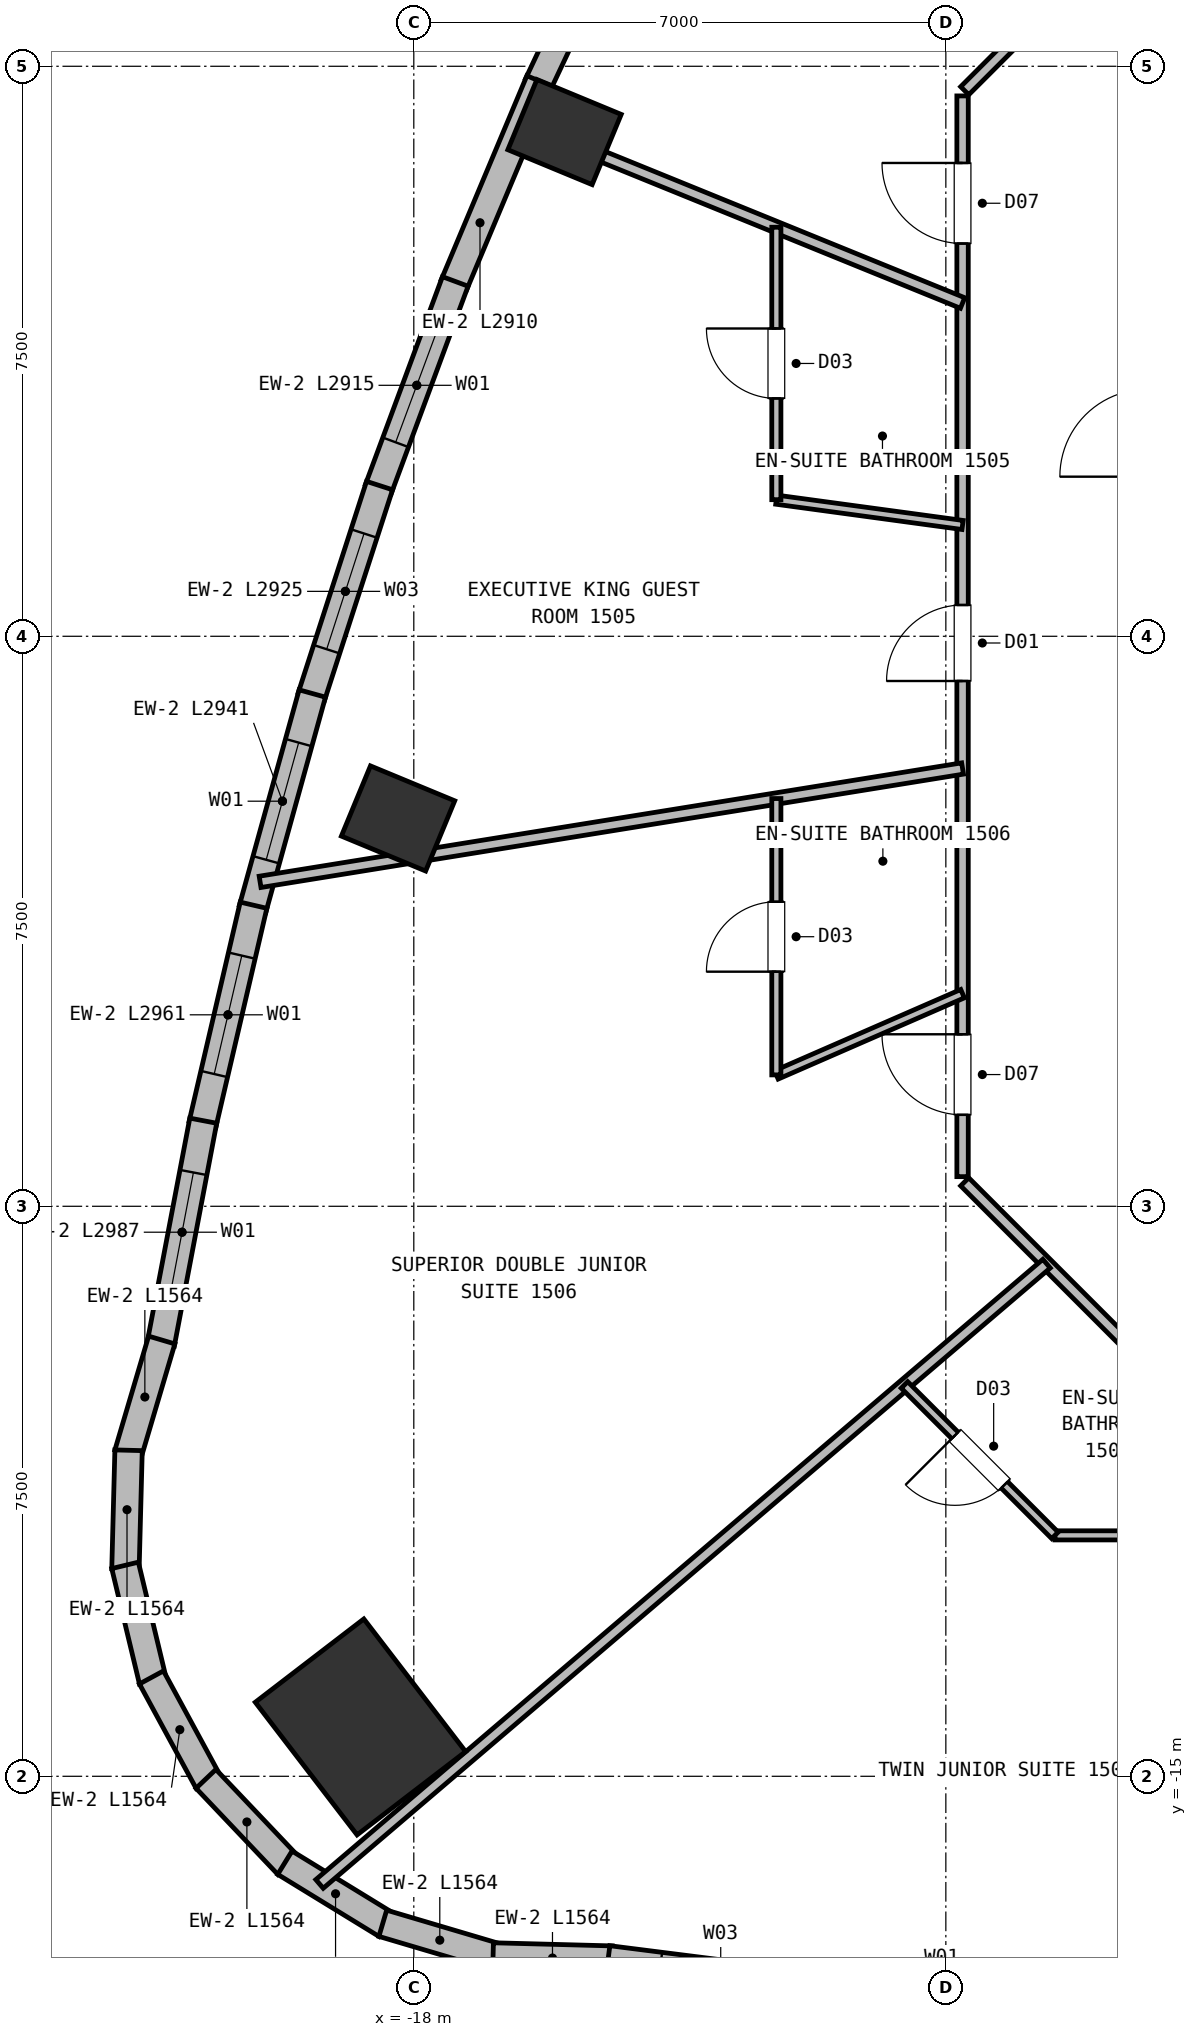
"""IFC4 building model, lengths in metres.
Left out: names, types, materials, properties, quantities, classifications, styles, units other than length and angle.
Written with IfcOpenShell. Run it as: python <this file> out.ifc"""

import sys

from ifc_helpers import new_model, si_unit, direction, frame, frame_2d, origin, origin_2d, place, context, subcontext, project, spatial, rectangle, extrude, element, fill, save


model = new_model("IFC4")
c1 = context("Model", 3, precision=1e-05, world=origin(), true_north=direction((0.0, 1.0)))
c2 = subcontext(c1, "Body", "Model", "MODEL_VIEW")
j1 = project(units=[si_unit("LENGTHUNIT", "METRE"), si_unit("PLANEANGLEUNIT", "RADIAN")], contexts=[c1])
p1 = place(None, origin())
s1 = spatial("IfcSite", under=j1, at=p1, CompositionType="ELEMENT")
p2 = place(p1, origin())
s2 = spatial("IfcBuilding", under=s1, at=p2, CompositionType="ELEMENT")
p3 = place(p2, frame((0.0, 0.0, 53.0)))
s3 = spatial("IfcBuildingStorey", under=s2, at=p3, CompositionType="ELEMENT", Elevation=53.0)
for number, where, z_axis, x_axis in (
    (1, (-16.017, 6.635, 0.0), (0.0, 0.0, 1.0), (0.383, 0.924, 0.0)),
    (2, (-18.207, -2.397, 0.0), (0.0, 0.0, 1.0), (0.383, 0.924, 0.0)),
):
    element("IfcColumn", number, at=place(p3, frame(where, z_axis=z_axis, x_axis=x_axis)), inside=s3, PredefinedType="COLUMN", context=c2, shape_type="SweptSolid", body=[
        extrude(rectangle(XDim=1.0, YDim=1.2, at=origin_2d()), origin(), (0.0, 0.0, 1.0), 3.75),
    ])
p4 = place(p3, frame((-18.702, -14.351, 0.0), z_axis=(0.0, 0.0, 1.0), x_axis=(0.793353340291, 0.608761429009, 0.0)))
e3 = element("IfcColumn", 3, at=p4, inside=s3, PredefinedType="COLUMN", context=c2, shape_type="SweptSolid", body=[
    extrude(rectangle(XDim=1.8, YDim=2.2, at=origin_2d()), origin(), (0.0, 0.0, 1.0), 3.75),
])
p5 = place(p3, frame((-16.367, 7.26, 0.0), z_axis=(0.0, 0.0, 1.0), x_axis=(0.426148545422, 0.904653202744, 0.0)))
e4 = element("IfcWall", 4, at=p5, inside=s3, PredefinedType="SOLIDWALL", context=c2, shape_type="SweptSolid", body=[
    extrude(rectangle(XDim=2.91, YDim=0.36, at=frame_2d((1.455, 0.0))), origin(), (0.0, 0.0, 1.0), 3.5),
])
p6 = place(p5, frame((0.86, 0.0, 0.72)))
e5 = element("IfcOpeningElement", 5, at=p6, cuts=e4, PredefinedType="OPENING", context=c2, shape_type="SweptSolid", body=[
    extrude(rectangle(XDim=1.6, YDim=1.88, at=frame_2d((0.8, 0.94))), frame((0.0, 0.19, 0.0), z_axis=(0.0, -1.0, 0.0), x_axis=(1.0, 0.0, 0.0)), (0.0, 0.0, 1.0), 0.38),
])
p7 = place(p3, frame((-17.473, 4.622, 0.0), z_axis=(0.0, 0.0, 1.0), x_axis=(0.387104109378, 0.922036012584, 0.0)))
e6 = element("IfcWall", 6, at=p7, inside=s3, PredefinedType="SOLIDWALL", context=c2, shape_type="SweptSolid", body=[
    extrude(rectangle(XDim=2.91, YDim=0.36, at=frame_2d((1.455, 0.0))), origin(), (0.0, 0.0, 1.0), 3.5),
])
p8 = place(p3, frame((-18.467, 1.936, 0.0), z_axis=(0.0, 0.0, 1.0), x_axis=(0.347513488828, 0.937674983714, 0.0)))
e7 = element("IfcWall", 7, at=p8, inside=s3, PredefinedType="SOLIDWALL", context=c2, shape_type="SweptSolid", body=[
    extrude(rectangle(XDim=2.915, YDim=0.36, at=frame_2d((1.458, 0.0))), origin(), (0.0, 0.0, 1.0), 3.5),
])
p9 = place(p8, frame((0.657, 0.0, 0.72)))
e8 = element("IfcOpeningElement", 8, at=p9, cuts=e7, PredefinedType="OPENING", context=c2, shape_type="SweptSolid", body=[
    extrude(rectangle(XDim=1.6, YDim=1.88, at=frame_2d((0.8, 0.94))), frame((0.0, 0.19, 0.0), z_axis=(0.0, -1.0, 0.0), x_axis=(1.0, 0.0, 0.0)), (0.0, 0.0, 1.0), 0.38),
])
p10 = place(p3, frame((-19.35, -0.801, 0.0), z_axis=(0.0, 0.0, 1.0), x_axis=(0.307375839582, 0.951588195199, 0.0)))
e9 = element("IfcWall", 9, at=p10, inside=s3, PredefinedType="SOLIDWALL", context=c2, shape_type="SweptSolid", body=[
    extrude(rectangle(XDim=2.925, YDim=0.36, at=frame_2d((1.463, 0.0))), origin(), (0.0, 0.0, 1.0), 3.5),
])
p11 = place(p10, frame((0.663, 0.0, 0.72)))
e10 = element("IfcOpeningElement", 10, at=p11, cuts=e9, PredefinedType="OPENING", context=c2, shape_type="SweptSolid", body=[
    extrude(rectangle(XDim=1.6, YDim=1.88, at=frame_2d((0.8, 0.94))), frame((0.0, 0.19, 0.0), z_axis=(0.0, -1.0, 0.0), x_axis=(1.0, 0.0, 0.0)), (0.0, 0.0, 1.0), 0.38),
])
p12 = place(p3, frame((-20.121, -3.587, 0.0), z_axis=(0.0, 0.0, 1.0), x_axis=(0.267147156335, 0.963655746033, 0.0)))
e11 = element("IfcWall", 11, at=p12, inside=s3, PredefinedType="SOLIDWALL", context=c2, shape_type="SweptSolid", body=[
    extrude(rectangle(XDim=2.941, YDim=0.36, at=frame_2d((1.47, 0.0))), origin(), (0.0, 0.0, 1.0), 3.5),
])
p13 = place(p12, frame((0.67, 0.0, 0.72)))
e12 = element("IfcOpeningElement", 12, at=p13, cuts=e11, PredefinedType="OPENING", context=c2, shape_type="SweptSolid", body=[
    extrude(rectangle(XDim=1.6, YDim=1.88, at=frame_2d((0.8, 0.94))), frame((0.0, 0.19, 0.0), z_axis=(0.0, -1.0, 0.0), x_axis=(1.0, 0.0, 0.0)), (0.0, 0.0, 1.0), 0.38),
])
p14 = place(p3, frame((-20.781, -6.423, 0.0), z_axis=(0.0, 0.0, 1.0), x_axis=(0.226888180994, 0.97392081471, 0.0)))
e13 = element("IfcWall", 13, at=p14, inside=s3, PredefinedType="SOLIDWALL", context=c2, shape_type="SweptSolid", body=[
    extrude(rectangle(XDim=2.961, YDim=0.36, at=frame_2d((1.48, 0.0))), origin(), (0.0, 0.0, 1.0), 3.5),
])
p15 = place(p14, frame((0.681, 0.0, 0.72)))
e14 = element("IfcOpeningElement", 14, at=p15, cuts=e13, PredefinedType="OPENING", context=c2, shape_type="SweptSolid", body=[
    extrude(rectangle(XDim=1.6, YDim=1.88, at=frame_2d((0.8, 0.94))), frame((0.0, 0.19, 0.0), z_axis=(0.0, -1.0, 0.0), x_axis=(1.0, 0.0, 0.0)), (0.0, 0.0, 1.0), 0.38),
])
p16 = place(p3, frame((-21.328, -9.308, 0.0), z_axis=(0.0, 0.0, 1.0), x_axis=(0.186834183521, 0.982391463658, 0.0)))
e15 = element("IfcWall", 15, at=p16, inside=s3, PredefinedType="SOLIDWALL", context=c2, shape_type="SweptSolid", body=[
    extrude(rectangle(XDim=2.987, YDim=0.36, at=frame_2d((1.494, 0.0))), origin(), (0.0, 0.0, 1.0), 3.5),
])
p17 = place(p16, frame((0.694, 0.0, 0.72)))
e16 = element("IfcOpeningElement", 16, at=p17, cuts=e15, PredefinedType="OPENING", context=c2, shape_type="SweptSolid", body=[
    extrude(rectangle(XDim=1.6, YDim=1.88, at=frame_2d((0.8, 0.94))), frame((0.0, 0.19, 0.0), z_axis=(0.0, -1.0, 0.0), x_axis=(1.0, 0.0, 0.0)), (0.0, 0.0, 1.0), 0.38),
])
p18 = place(p3, frame((-21.76, -10.76, 0.0), z_axis=(0.0, 0.0, 1.0), x_axis=(0.283923577164, 0.958846912875, 0.0)))
e17 = element("IfcWall", 17, at=p18, inside=s3, PredefinedType="SOLIDWALL", context=c2, shape_type="SweptSolid", body=[
    extrude(rectangle(XDim=1.564, YDim=0.36, at=frame_2d((0.782, 0.0))), origin(), (0.0, 0.0, 1.0), 3.5),
])
p19 = place(p3, frame((-21.794, -12.274, 0.0), z_axis=(0.0, 0.0, 1.0), x_axis=(0.026224581645, 0.999656076517, 0.0)))
e18 = element("IfcWall", 18, at=p19, inside=s3, PredefinedType="SOLIDWALL", context=c2, shape_type="SweptSolid", body=[
    extrude(rectangle(XDim=1.564, YDim=0.36, at=frame_2d((0.782, 0.0))), origin(), (0.0, 0.0, 1.0), 3.5),
])
for number, where, z_axis, x_axis in (
    (19, (-21.434, -13.746, 0.0), (0.0, 0.0, 1.0), (-0.233, 0.972, 0.0)),
    (20, (-20.705, -15.074, 0.0), (0.0, 0.0, 1.0), (-0.477, 0.879, 0.0)),
):
    element("IfcWall", number, at=place(p3, frame(where, z_axis=z_axis, x_axis=x_axis)), inside=s3, PredefinedType="SOLIDWALL", context=c2, shape_type="SweptSolid", body=[
        extrude(rectangle(XDim=1.564, YDim=0.36, at=frame_2d((0.782, 0.0))), origin(), (0.0, 0.0, 1.0), 3.5),
    ])
for number, where, z_axis, x_axis in (
    (21, (-19.658, -16.168, 0.0), (0.0, 0.0, 1.0), (-0.688, 0.725, 0.0)),
    (22, (-18.363, -16.954, 0.0), (0.0, 0.0, 1.0), (-0.853, 0.522, 0.0)),
):
    element("IfcWall", number, at=place(p3, frame(where, z_axis=z_axis, x_axis=x_axis)), inside=s3, PredefinedType="SOLIDWALL", context=c2, shape_type="SweptSolid", body=[
        extrude(rectangle(XDim=1.564, YDim=0.36, at=frame_2d((0.782, 0.0))), origin(), (0.0, 0.0, 1.0), 3.5),
    ])
for number, where, z_axis, x_axis in (
    (23, (-16.908, -17.378, 0.0), (0.0, 0.0, 1.0), (-0.959, 0.284, 0.0)),
    (24, (-15.394, -17.412, 0.0), (0.0, 0.0, 1.0), (-1.0, 0.026, 0.0)),
):
    element("IfcWall", number, at=place(p3, frame(where, z_axis=z_axis, x_axis=x_axis)), inside=s3, PredefinedType="SOLIDWALL", context=c2, shape_type="SweptSolid", body=[
        extrude(rectangle(XDim=1.564, YDim=0.36, at=frame_2d((0.782, 0.0))), origin(), (0.0, 0.0, 1.0), 3.5),
    ])
p20 = place(p3, frame((-12.48, -17.784, 0.0), z_axis=(0.0, 0.0, 1.0), x_axis=(-0.992056250625, 0.125795053943, 0.0)))
e25 = element("IfcWall", 25, at=p20, inside=s3, PredefinedType="SOLIDWALL", context=c2, shape_type="SweptSolid", body=[
    extrude(rectangle(XDim=2.987, YDim=0.36, at=frame_2d((1.493, 0.0))), origin(), (0.0, 0.0, 1.0), 3.5),
])
p21 = place(p20, frame((0.694, 0.0, 0.72)))
e26 = element("IfcOpeningElement", 26, at=p21, cuts=e25, PredefinedType="OPENING", context=c2, shape_type="SweptSolid", body=[
    extrude(rectangle(XDim=1.6, YDim=1.88, at=frame_2d((0.8, 0.94))), frame((0.0, 0.19, 0.0), z_axis=(0.0, -1.0, 0.0), x_axis=(1.0, 0.0, 0.0)), (0.0, 0.0, 1.0), 0.38),
])
p22 = place(p3, frame((-10.752, 7.178, 0.0), z_axis=(0.0, 0.0, 1.0), x_axis=(0.707067066127, 0.707146494016, 0.0)))
e27 = element("IfcWall", 27, at=p22, inside=s3, PredefinedType="PARTITIONING", context=c2, shape_type="SweptSolid", body=[
    extrude(rectangle(XDim=3.074, YDim=0.15, at=frame_2d((1.537, 0.0))), origin(), (0.0, 0.0, 1.0), 3.5),
])
p23 = place(p3, frame((-10.78, -7.11, 0.0), z_axis=(0.0, 0.0, 1.0), x_axis=(0.0, 1.0, 0.0)))
e28 = element("IfcWall", 28, at=p23, inside=s3, PredefinedType="PARTITIONING", context=c2, shape_type="SweptSolid", body=[
    extrude(rectangle(XDim=14.22, YDim=0.15, at=frame_2d((7.11, 0.0))), origin(), (0.0, 0.0, 1.0), 3.12),
])
p24 = place(p23, frame((12.278, 0.0, 0.0)))
e29 = element("IfcOpeningElement", 29, at=p24, cuts=e28, PredefinedType="OPENING", context=c2, shape_type="SweptSolid", body=[
    extrude(rectangle(XDim=1.06, YDim=2.15, at=frame_2d((0.53, 1.075))), frame((0.0, 0.085, 0.0), z_axis=(0.0, -1.0, 0.0), x_axis=(1.0, 0.0, 0.0)), (0.0, 0.0, 1.0), 0.17),
])
p25 = place(p23, frame((6.521, 0.0, 0.0)))
e30 = element("IfcOpeningElement", 30, at=p25, cuts=e28, PredefinedType="OPENING", context=c2, shape_type="SweptSolid", body=[
    extrude(rectangle(XDim=1.0, YDim=2.15, at=frame_2d((0.5, 1.075))), frame((0.0, 0.085, 0.0), z_axis=(0.0, -1.0, 0.0), x_axis=(1.0, 0.0, 0.0)), (0.0, 0.0, 1.0), 0.17),
])
p26 = place(p23, frame((0.813, 0.0, 0.0)))
e31 = element("IfcOpeningElement", 31, at=p26, cuts=e28, PredefinedType="OPENING", context=c2, shape_type="SweptSolid", body=[
    extrude(rectangle(XDim=1.06, YDim=2.15, at=frame_2d((0.53, 1.075))), frame((0.0, 0.085, 0.0), z_axis=(0.0, -1.0, 0.0), x_axis=(1.0, 0.0, 0.0)), (0.0, 0.0, 1.0), 0.17),
])
p27 = place(p3, frame((-8.578, -9.352, 0.0), z_axis=(0.0, 0.0, 1.0), x_axis=(-0.707067066127, 0.707146494016, 0.0)))
e32 = element("IfcWall", 32, at=p27, inside=s3, PredefinedType="PARTITIONING", context=c2, shape_type="SweptSolid", body=[
    extrude(rectangle(XDim=3.074, YDim=0.15, at=frame_2d((1.537, 0.0))), origin(), (0.0, 0.0, 1.0), 3.5),
])
p28 = place(p3, frame((-10.78, 4.385, 0.0), z_axis=(0.0, 0.0, 1.0), x_axis=(-0.926285946265, 0.376821371146, 0.0)))
e33 = element("IfcWall", 33, at=p28, inside=s3, PredefinedType="PARTITIONING", context=c2, shape_type="SweptSolid", body=[
    extrude(rectangle(XDim=6.263, YDim=0.15, at=frame_2d((3.132, 0.0))), origin(), (0.0, 0.0, 1.0), 3.5),
])
p29 = place(p3, frame((-10.78, 1.465, 0.0), z_axis=(0.0, 0.0, 1.0), x_axis=(-0.990901533964, 0.134588818215, 0.0)))
e34 = element("IfcWall", 34, at=p29, inside=s3, PredefinedType="PARTITIONING", context=c2, shape_type="SweptSolid", body=[
    extrude(rectangle(XDim=2.472, YDim=0.12, at=frame_2d((1.236, 0.0))), origin(), (0.0, 0.0, 1.0), 3.5),
])
p30 = place(p3, frame((-13.23, 1.797, 0.0), z_axis=(0.0, 0.0, 1.0), x_axis=(0.0, 1.0, 0.0)))
e35 = element("IfcWall", 35, at=p30, inside=s3, PredefinedType="PARTITIONING", context=c2, shape_type="SweptSolid", body=[
    extrude(rectangle(XDim=3.585, YDim=0.12, at=frame_2d((1.792, 0.0))), origin(), (0.0, 0.0, 1.0), 3.5),
])
p31 = place(p30, frame((1.332, 0.0, 0.0)))
e36 = element("IfcOpeningElement", 36, at=p31, cuts=e35, PredefinedType="OPENING", context=c2, shape_type="SweptSolid", body=[
    extrude(rectangle(XDim=0.92, YDim=2.1, at=frame_2d((0.46, 1.05))), frame((0.0, 0.07, 0.0), z_axis=(0.0, -1.0, 0.0), x_axis=(1.0, 0.0, 0.0)), (0.0, 0.0, 1.0), 0.14),
])
p32 = place(p3, frame((-10.78, -1.74, 0.0), z_axis=(0.0, 0.0, 1.0), x_axis=(-0.987228687092, -0.159309508134, 0.0)))
e37 = element("IfcWall", 37, at=p32, inside=s3, PredefinedType="PARTITIONING", context=c2, shape_type="SweptSolid", body=[
    extrude(rectangle(XDim=9.362, YDim=0.15, at=frame_2d((4.681, 0.0))), origin(), (0.0, 0.0, 1.0), 3.5),
])
p33 = place(p3, frame((-10.78, -4.702, 0.0), z_axis=(0.0, 0.0, 1.0), x_axis=(-0.916569813028, -0.399874702684, 0.0)))
e38 = element("IfcWall", 38, at=p33, inside=s3, PredefinedType="PARTITIONING", context=c2, shape_type="SweptSolid", body=[
    extrude(rectangle(XDim=2.673, YDim=0.12, at=frame_2d((1.336, 0.0))), origin(), (0.0, 0.0, 1.0), 3.5),
])
p34 = place(p3, frame((-13.23, -5.771, 0.0), z_axis=(0.0, 0.0, 1.0), x_axis=(0.0, 1.0, 0.0)))
e39 = element("IfcWall", 39, at=p34, inside=s3, PredefinedType="PARTITIONING", context=c2, shape_type="SweptSolid", body=[
    extrude(rectangle(XDim=3.636, YDim=0.12, at=frame_2d((1.818, 0.0))), origin(), (0.0, 0.0, 1.0), 3.12),
])
p35 = place(p34, frame((1.358, 0.0, 0.0)))
e40 = element("IfcOpeningElement", 40, at=p35, cuts=e39, PredefinedType="OPENING", context=c2, shape_type="SweptSolid", body=[
    extrude(rectangle(XDim=0.92, YDim=2.1, at=frame_2d((0.46, 1.05))), frame((0.0, 0.07, 0.0), z_axis=(0.0, -1.0, 0.0), x_axis=(1.0, 0.0, 0.0)), (0.0, 0.0, 1.0), 0.14),
])
p36 = place(p3, frame((-9.675, -8.255, 0.0), z_axis=(0.0, 0.0, 1.0), x_axis=(-0.760712977927, -0.649088410937, 0.0)))
e41 = element("IfcWall", 41, at=p36, inside=s3, PredefinedType="PARTITIONING", context=c2, shape_type="SweptSolid", body=[
    extrude(rectangle(XDim=12.574, YDim=0.15, at=frame_2d((6.287, 0.0))), origin(), (0.0, 0.0, 1.0), 3.5),
])
p37 = place(p3, frame((-8.604, -11.83, 0.0), z_axis=(0.0, 0.0, 1.0), x_axis=(-1.0, 0.0, 0.0)))
e42 = element("IfcWall", 42, at=p37, inside=s3, PredefinedType="PARTITIONING", context=c2, shape_type="SweptSolid", body=[
    extrude(rectangle(XDim=0.961, YDim=0.12, at=frame_2d((0.48, 0.0))), origin(), (0.0, 0.0, 1.0), 3.5),
])
p38 = place(p3, frame((-9.565, -11.83, 0.0), z_axis=(0.0, 0.0, 1.0), x_axis=(-0.707150377276, 0.707063182409, 0.0)))
e43 = element("IfcWall", 43, at=p38, inside=s3, PredefinedType="PARTITIONING", context=c2, shape_type="SweptSolid", body=[
    extrude(rectangle(XDim=2.8, YDim=0.12, at=frame_2d((1.4, 0.0))), origin(), (0.0, 0.0, 1.0), 3.5),
])
p39 = place(p38, frame((0.94, 0.0, 0.0)))
e44 = element("IfcOpeningElement", 44, at=p39, cuts=e43, PredefinedType="OPENING", context=c2, shape_type="SweptSolid", body=[
    extrude(rectangle(XDim=0.92, YDim=2.1, at=frame_2d((0.46, 1.05))), frame((0.0, 0.07, 0.0), z_axis=(0.0, -1.0, 0.0), x_axis=(1.0, 0.0, 0.0)), (0.0, 0.0, 1.0), 0.14),
])
p40 = place(p9, origin())
e45 = element("IfcWindow", 45, at=p40, inside=s3, PartitioningType="SINGLE_PANEL", PredefinedType="WINDOW", context=c2, shape_type="SweptSolid", body=[
    extrude(rectangle(XDim=1.6, YDim=1.88, at=frame_2d((0.8, 0.94))), frame((0.0, 0.03, 0.0), z_axis=(0.0, -1.0, 0.0), x_axis=(1.0, 0.0, 0.0)), (0.0, 0.0, 1.0), 0.06),
])
fill(e8, e45)
p41 = place(p11, origin())
e46 = element("IfcWindow", 46, at=p41, inside=s3, PartitioningType="SINGLE_PANEL", PredefinedType="WINDOW", context=c2, shape_type="SweptSolid", body=[
    extrude(rectangle(XDim=1.6, YDim=1.88, at=frame_2d((0.8, 0.94))), frame((0.0, 0.03, 0.0), z_axis=(0.0, -1.0, 0.0), x_axis=(1.0, 0.0, 0.0)), (0.0, 0.0, 1.0), 0.06),
])
fill(e10, e46)
p42 = place(p13, origin())
e47 = element("IfcWindow", 47, at=p42, inside=s3, PartitioningType="SINGLE_PANEL", PredefinedType="WINDOW", context=c2, shape_type="SweptSolid", body=[
    extrude(rectangle(XDim=1.6, YDim=1.88, at=frame_2d((0.8, 0.94))), frame((0.0, 0.03, 0.0), z_axis=(0.0, -1.0, 0.0), x_axis=(1.0, 0.0, 0.0)), (0.0, 0.0, 1.0), 0.06),
])
fill(e12, e47)
p43 = place(p15, origin())
e48 = element("IfcWindow", 48, at=p43, inside=s3, PartitioningType="SINGLE_PANEL", PredefinedType="WINDOW", context=c2, shape_type="SweptSolid", body=[
    extrude(rectangle(XDim=1.6, YDim=1.88, at=frame_2d((0.8, 0.94))), frame((0.0, 0.03, 0.0), z_axis=(0.0, -1.0, 0.0), x_axis=(1.0, 0.0, 0.0)), (0.0, 0.0, 1.0), 0.06),
])
fill(e14, e48)
p44 = place(p17, origin())
e49 = element("IfcWindow", 49, at=p44, inside=s3, PartitioningType="SINGLE_PANEL", PredefinedType="WINDOW", context=c2, shape_type="SweptSolid", body=[
    extrude(rectangle(XDim=1.6, YDim=1.88, at=frame_2d((0.8, 0.94))), frame((0.0, 0.03, 0.0), z_axis=(0.0, -1.0, 0.0), x_axis=(1.0, 0.0, 0.0)), (0.0, 0.0, 1.0), 0.06),
])
fill(e16, e49)
p45 = place(p31, origin())
e50 = element("IfcDoor", 50, at=p45, inside=s3, OperationType="SINGLE_SWING_RIGHT", PredefinedType="DOOR", context=c2, shape_type="SweptSolid", body=[
    extrude(rectangle(XDim=0.92, YDim=2.1, at=frame_2d((0.46, 1.05))), frame((0.0, 0.025, 0.0), z_axis=(0.0, -1.0, 0.0), x_axis=(1.0, 0.0, 0.0)), (0.0, 0.0, 1.0), 0.05),
])
fill(e36, e50)
p46 = place(p35, origin())
e51 = element("IfcDoor", 51, at=p46, inside=s3, OperationType="SINGLE_SWING_LEFT", PredefinedType="DOOR", context=c2, shape_type="SweptSolid", body=[
    extrude(rectangle(XDim=0.92, YDim=2.1, at=frame_2d((0.46, 1.05))), frame((0.0, 0.025, 0.0), z_axis=(0.0, -1.0, 0.0), x_axis=(1.0, 0.0, 0.0)), (0.0, 0.0, 1.0), 0.05),
])
fill(e40, e51)
p47 = place(p39, origin())
e52 = element("IfcDoor", 52, at=p47, inside=s3, OperationType="SINGLE_SWING_RIGHT", PredefinedType="DOOR", context=c2, shape_type="SweptSolid", body=[
    extrude(rectangle(XDim=0.92, YDim=2.1, at=frame_2d((0.46, 1.05))), frame((0.0, 0.025, 0.0), z_axis=(0.0, -1.0, 0.0), x_axis=(1.0, 0.0, 0.0)), (0.0, 0.0, 1.0), 0.05),
])
fill(e44, e52)
p48 = place(p24, origin())
e53 = element("IfcDoor", 53, at=p48, inside=s3, OperationType="SINGLE_SWING_RIGHT", PredefinedType="DOOR", context=c2, shape_type="SweptSolid", body=[
    extrude(rectangle(XDim=1.06, YDim=2.15, at=frame_2d((0.53, 1.075))), frame((0.0, 0.025, 0.0), z_axis=(0.0, -1.0, 0.0), x_axis=(1.0, 0.0, 0.0)), (0.0, 0.0, 1.0), 0.05),
])
fill(e29, e53)
p49 = place(p25, origin())
e54 = element("IfcDoor", 54, at=p49, inside=s3, OperationType="SINGLE_SWING_LEFT", PredefinedType="DOOR", context=c2, shape_type="SweptSolid", body=[
    extrude(rectangle(XDim=1.0, YDim=2.15, at=frame_2d((0.5, 1.075))), frame((0.0, 0.025, 0.0), z_axis=(0.0, -1.0, 0.0), x_axis=(1.0, 0.0, 0.0)), (0.0, 0.0, 1.0), 0.05),
])
fill(e30, e54)
p50 = place(p26, origin())
e55 = element("IfcDoor", 55, at=p50, inside=s3, OperationType="SINGLE_SWING_RIGHT", PredefinedType="DOOR", context=c2, shape_type="SweptSolid", body=[
    extrude(rectangle(XDim=1.06, YDim=2.15, at=frame_2d((0.53, 1.075))), frame((0.0, 0.025, 0.0), z_axis=(0.0, -1.0, 0.0), x_axis=(1.0, 0.0, 0.0)), (0.0, 0.0, 1.0), 0.05),
])
fill(e31, e55)
save(model, sys.argv[1])
